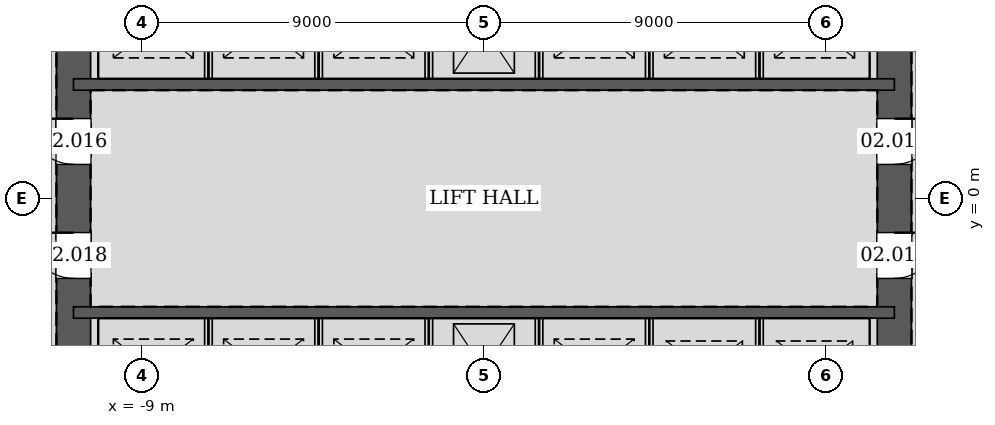
"""IFC4 building model, lengths in metres.
Left out: names, types, materials, properties, quantities, classifications, styles, units other than length and angle.
Written with IfcOpenShell. Run it as: python <this file> out.ifc"""

import sys

from ifc_helpers import new_model, si_unit, direction, frame, frame_2d, origin, place, context, subcontext, project, spatial, rectangle, extrude, element, fill, save


model = new_model("IFC4")
c1 = context("Model", 3, precision=1e-05, world=origin(), true_north=direction((0.0, 1.0)))
c2 = subcontext(c1, "Body", "Model", "MODEL_VIEW")
j1 = project(units=[si_unit("LENGTHUNIT", "METRE"), si_unit("PLANEANGLEUNIT", "RADIAN")], contexts=[c1])
p1 = place(None, origin())
s1 = spatial("IfcSite", under=j1, at=p1, CompositionType="ELEMENT")
p2 = place(p1, origin())
s2 = spatial("IfcBuilding", under=s1, at=p2, CompositionType="ELEMENT")
p3 = place(p2, frame((0.0, 0.0, 13.2)))
s3 = spatial("IfcBuildingStorey", under=s2, at=p3, CompositionType="ELEMENT", Elevation=13.2)
p4 = place(p3, frame((10.8, -10.8, 0.0), z_axis=(0.0, 0.0, 1.0), x_axis=(0.0, 1.0, 0.0)))
e1 = element("IfcWall", 1, at=p4, inside=s3, PredefinedType="SOLIDWALL", context=c2, shape_type="SweptSolid", body=[
    extrude(rectangle(XDim=21.6, YDim=0.9, at=frame_2d((10.8, 0.0))), origin(), (0.0, 0.0, 1.0), 5.4),
])
p5 = place(p4, frame((11.7, 0.0, 0.0)))
e2 = element("IfcOpeningElement", 2, at=p5, cuts=e1, PredefinedType="OPENING", context=c2, shape_type="SweptSolid", body=[
    extrude(rectangle(XDim=1.2, YDim=2.1, at=frame_2d((0.6, 1.05))), frame((0.0, 0.46, 0.0), z_axis=(0.0, -1.0, 0.0), x_axis=(1.0, 0.0, 0.0)), (0.0, 0.0, 1.0), 0.92),
])
p6 = place(p4, frame((8.7, 0.0, 0.0)))
e3 = element("IfcOpeningElement", 3, at=p6, cuts=e1, PredefinedType="OPENING", context=c2, shape_type="SweptSolid", body=[
    extrude(rectangle(XDim=1.2, YDim=2.1, at=frame_2d((0.6, 1.05))), frame((0.0, 0.46, 0.0), z_axis=(0.0, -1.0, 0.0), x_axis=(1.0, 0.0, 0.0)), (0.0, 0.0, 1.0), 0.92),
])
p7 = place(p3, frame((-10.8, 10.8, 0.0), z_axis=(0.0, 0.0, 1.0), x_axis=(0.0, -1.0, 0.0)))
e4 = element("IfcWall", 4, at=p7, inside=s3, PredefinedType="SOLIDWALL", context=c2, shape_type="SweptSolid", body=[
    extrude(rectangle(XDim=21.6, YDim=0.9, at=frame_2d((10.8, 0.0))), origin(), (0.0, 0.0, 1.0), 5.4),
])
p8 = place(p7, frame((8.7, 0.0, 0.0)))
e5 = element("IfcOpeningElement", 5, at=p8, cuts=e4, PredefinedType="OPENING", context=c2, shape_type="SweptSolid", body=[
    extrude(rectangle(XDim=1.2, YDim=2.1, at=frame_2d((0.6, 1.05))), frame((0.0, 0.46, 0.0), z_axis=(0.0, -1.0, 0.0), x_axis=(1.0, 0.0, 0.0)), (0.0, 0.0, 1.0), 0.92),
])
p9 = place(p7, frame((11.7, 0.0, 0.0)))
e6 = element("IfcOpeningElement", 6, at=p9, cuts=e4, PredefinedType="OPENING", context=c2, shape_type="SweptSolid", body=[
    extrude(rectangle(XDim=1.2, YDim=2.1, at=frame_2d((0.6, 1.05))), frame((0.0, 0.46, 0.0), z_axis=(0.0, -1.0, 0.0), x_axis=(1.0, 0.0, 0.0)), (0.0, 0.0, 1.0), 0.92),
])
for number, where, z_axis, x_axis in (
    (7, (-10.8, 3.0, 0.0), (0.0, 0.0, 1.0), (1.0, 0.0, 0.0)),
    (8, (-10.8, -3.0, 0.0), (0.0, 0.0, 1.0), (1.0, 0.0, 0.0)),
):
    element("IfcWall", number, at=place(p3, frame(where, z_axis=z_axis, x_axis=x_axis)), inside=s3, PredefinedType="SOLIDWALL", context=c2, shape_type="SweptSolid", body=[
        extrude(rectangle(XDim=21.6, YDim=0.3, at=frame_2d((10.8, 0.0))), origin(), (0.0, 0.0, 1.0), 5.4),
    ])
for number, where, z_axis, x_axis in (
    (9, (-7.25, 3.15, 0.0), (0.0, 0.0, 1.0), (0.0, 1.0, 0.0)),
    (10, (-4.35, 3.15, 0.0), (0.0, 0.0, 1.0), (0.0, 1.0, 0.0)),
    (11, (-1.45, 3.15, 0.0), (0.0, 0.0, 1.0), (0.0, 1.0, 0.0)),
    (12, (1.45, 3.15, 0.0), (0.0, 0.0, 1.0), (0.0, 1.0, 0.0)),
    (13, (4.35, 3.15, 0.0), (0.0, 0.0, 1.0), (0.0, 1.0, 0.0)),
    (14, (7.25, 3.15, 0.0), (0.0, 0.0, 1.0), (0.0, 1.0, 0.0)),
    (15, (-7.25, -5.85, 0.0), (0.0, 0.0, 1.0), (0.0, 1.0, 0.0)),
    (16, (-4.35, -5.85, 0.0), (0.0, 0.0, 1.0), (0.0, 1.0, 0.0)),
    (17, (-1.45, -5.85, 0.0), (0.0, 0.0, 1.0), (0.0, 1.0, 0.0)),
    (18, (1.45, -5.85, 0.0), (0.0, 0.0, 1.0), (0.0, 1.0, 0.0)),
    (19, (4.35, -5.85, 0.0), (0.0, 0.0, 1.0), (0.0, 1.0, 0.0)),
    (20, (7.25, -5.85, 0.0), (0.0, 0.0, 1.0), (0.0, 1.0, 0.0)),
):
    element("IfcWall", number, at=place(p3, frame(where, z_axis=z_axis, x_axis=x_axis)), inside=s3, PredefinedType="PARTITIONING", context=c2, shape_type="SweptSolid", body=[
        extrude(rectangle(XDim=2.7, YDim=0.2, at=frame_2d((1.35, 0.0))), origin(), (0.0, 0.0, 1.0), 5.4),
    ])
p10 = place(p5, frame((1.2, 0.0, 0.0), z_axis=(0.0, 0.0, 1.0), x_axis=(-1.0, 0.0, 0.0)))
e21 = element("IfcDoor", 21, at=p10, inside=s3, OperationType="SINGLE_SWING_LEFT", PredefinedType="DOOR", context=c2, shape_type="SweptSolid", body=[
    extrude(rectangle(XDim=1.2, YDim=2.1, at=frame_2d((0.6, 1.05))), frame((0.0, 0.025, 0.0), z_axis=(0.0, -1.0, 0.0), x_axis=(1.0, 0.0, 0.0)), (0.0, 0.0, 1.0), 0.05),
])
fill(e2, e21)
p11 = place(p8, frame((1.2, 0.0, 0.0), z_axis=(0.0, 0.0, 1.0), x_axis=(-1.0, 0.0, 0.0)))
e22 = element("IfcDoor", 22, at=p11, inside=s3, OperationType="SINGLE_SWING_RIGHT", PredefinedType="DOOR", context=c2, shape_type="SweptSolid", body=[
    extrude(rectangle(XDim=1.2, YDim=2.1, at=frame_2d((0.6, 1.05))), frame((0.0, 0.025, 0.0), z_axis=(0.0, -1.0, 0.0), x_axis=(1.0, 0.0, 0.0)), (0.0, 0.0, 1.0), 0.05),
])
fill(e5, e22)
p12 = place(p6, frame((1.2, 0.0, 0.0), z_axis=(0.0, 0.0, 1.0), x_axis=(-1.0, 0.0, 0.0)))
e23 = element("IfcDoor", 23, at=p12, inside=s3, OperationType="SINGLE_SWING_LEFT", PredefinedType="DOOR", context=c2, shape_type="SweptSolid", body=[
    extrude(rectangle(XDim=1.2, YDim=2.1, at=frame_2d((0.6, 1.05))), frame((0.0, 0.025, 0.0), z_axis=(0.0, -1.0, 0.0), x_axis=(1.0, 0.0, 0.0)), (0.0, 0.0, 1.0), 0.05),
])
fill(e3, e23)
p13 = place(p9, frame((1.2, 0.0, 0.0), z_axis=(0.0, 0.0, 1.0), x_axis=(-1.0, 0.0, 0.0)))
e24 = element("IfcDoor", 24, at=p13, inside=s3, OperationType="SINGLE_SWING_RIGHT", PredefinedType="DOOR", context=c2, shape_type="SweptSolid", body=[
    extrude(rectangle(XDim=1.2, YDim=2.1, at=frame_2d((0.6, 1.05))), frame((0.0, 0.025, 0.0), z_axis=(0.0, -1.0, 0.0), x_axis=(1.0, 0.0, 0.0)), (0.0, 0.0, 1.0), 0.05),
])
fill(e6, e24)
save(model, sys.argv[1])
